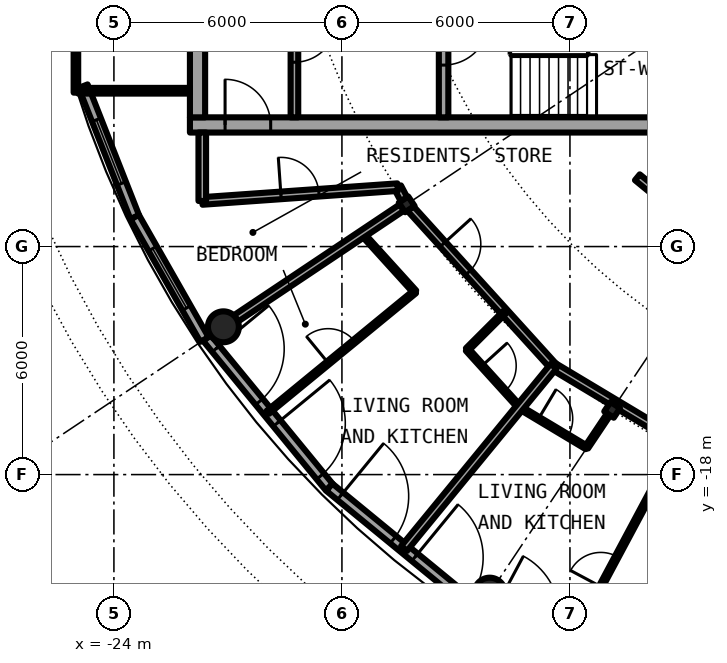
"""IFC4 building model, lengths in metres.
Left out: names, types, materials, properties, quantities, classifications, styles, units other than length and angle.
Written with IfcOpenShell. Run it as: python <this file> out.ifc"""

import sys

from ifc_helpers import new_model, si_unit, direction, frame, frame_2d, origin, origin_2d, place, context, subcontext, project, spatial, rectangle, hollow_circle, i_section, extrude, element, fill, save


model = new_model("IFC4")
c1 = context("Model", 3, precision=1e-05, world=origin(), true_north=direction((0.0, 1.0)))
c2 = subcontext(c1, "Body", "Model", "MODEL_VIEW")
j1 = project(units=[si_unit("LENGTHUNIT", "METRE"), si_unit("PLANEANGLEUNIT", "RADIAN")], contexts=[c1])
p1 = place(None, origin())
s1 = spatial("IfcSite", under=j1, at=p1, CompositionType="ELEMENT")
p2 = place(p1, origin())
s2 = spatial("IfcBuilding", under=s1, at=p2, CompositionType="ELEMENT")
p3 = place(p2, frame((0.0, 0.0, 237.1)))
s3 = spatial("IfcBuildingStorey", under=s2, at=p3, CompositionType="ELEMENT", Elevation=237.1)
for number, where, z_axis, x_axis in (
    (1, (-21.119, -14.112, 0.0), (0.0, 0.0, 1.0), (1.0, 0.0, 0.0)),
    (2, (-14.112, -21.119, 0.0), (0.0, 0.0, 1.0), (1.0, 0.0, 0.0)),
):
    element("IfcColumn", number, at=place(p3, frame(where, z_axis=z_axis, x_axis=x_axis)), inside=s3, PredefinedType="COLUMN", context=c2, shape_type="SweptSolid", body=[
        extrude(hollow_circle(Radius=0.406, WallThickness=0.03, at=origin_2d()), origin(), (0.0, 0.0, 1.0), 3.05),
    ])
for number, where, z_axis, x_axis in (
    (3, (-16.297, -10.889, 0.0), (0.0, 0.0, 1.0), (-0.831, -0.556, 0.0)),
    (4, (-10.889, -16.297, 0.0), (0.0, 0.0, 1.0), (-0.556, -0.831, 0.0)),
):
    element("IfcColumn", number, at=place(p3, frame(where, z_axis=z_axis, x_axis=x_axis)), inside=s3, PredefinedType="COLUMN", context=c2, shape_type="SweptSolid", body=[
        extrude(i_section(OverallWidth=0.3, OverallDepth=0.3, WebThickness=0.011, FlangeThickness=0.019, FilletRadius=0.027, at=origin_2d()), origin(), (0.0, 0.0, 1.0), 3.05),
    ])
p4 = place(p3, frame((-21.556, -14.403, 0.0), z_axis=(0.0, 0.0, 1.0), x_axis=(0.63433059803, -0.77306189429, 0.0)))
e5 = element("IfcWall", 5, at=p4, inside=s3, PredefinedType="SOLIDWALL", context=c2, shape_type="SweptSolid", body=[
    extrude(rectangle(XDim=5.082, YDim=0.25, at=frame_2d((2.541, 0.0))), origin(), (0.0, 0.0, 1.0), 2.7),
])
p5 = place(p4, frame((0.374, 0.0, 0.0)))
e6 = element("IfcOpeningElement", 6, at=p5, cuts=e5, PredefinedType="OPENING", context=c2, shape_type="SweptSolid", body=[
    extrude(rectangle(XDim=1.8, YDim=2.2, at=frame_2d((0.9, 1.1))), frame((0.0, 0.135, 0.0), z_axis=(0.0, -1.0, 0.0), x_axis=(1.0, 0.0, 0.0)), (0.0, 0.0, 1.0), 0.27),
])
p6 = place(p4, frame((2.909, 0.0, 0.0)))
e7 = element("IfcOpeningElement", 7, at=p6, cuts=e5, PredefinedType="OPENING", context=c2, shape_type="SweptSolid", body=[
    extrude(rectangle(XDim=1.8, YDim=2.2, at=frame_2d((0.9, 1.1))), frame((0.0, 0.135, 0.0), z_axis=(0.0, -1.0, 0.0), x_axis=(1.0, 0.0, 0.0)), (0.0, 0.0, 1.0), 0.27),
])
p7 = place(p3, frame((-18.332, -18.332, 0.0), z_axis=(0.0, 0.0, 1.0), x_axis=(0.77306189429, -0.63433059803, 0.0)))
e8 = element("IfcWall", 8, at=p7, inside=s3, PredefinedType="SOLIDWALL", context=c2, shape_type="SweptSolid", body=[
    extrude(rectangle(XDim=5.082, YDim=0.25, at=frame_2d((2.541, 0.0))), origin(), (0.0, 0.0, 1.0), 2.7),
])
p8 = place(p7, frame((0.374, 0.0, 0.0)))
e9 = element("IfcOpeningElement", 9, at=p8, cuts=e8, PredefinedType="OPENING", context=c2, shape_type="SweptSolid", body=[
    extrude(rectangle(XDim=1.8, YDim=2.2, at=frame_2d((0.9, 1.1))), frame((0.0, 0.135, 0.0), z_axis=(0.0, -1.0, 0.0), x_axis=(1.0, 0.0, 0.0)), (0.0, 0.0, 1.0), 0.27),
])
p9 = place(p7, frame((2.909, 0.0, 0.0)))
e10 = element("IfcOpeningElement", 10, at=p9, cuts=e8, PredefinedType="OPENING", context=c2, shape_type="SweptSolid", body=[
    extrude(rectangle(XDim=1.8, YDim=2.2, at=frame_2d((0.9, 1.1))), frame((0.0, 0.135, 0.0), z_axis=(0.0, -1.0, 0.0), x_axis=(1.0, 0.0, 0.0)), (0.0, 0.0, 1.0), 0.27),
])
p10 = place(p3, frame((-24.809, -7.779, 0.0), z_axis=(0.0, 0.0, 1.0), x_axis=(0.366351636034, -0.930476479432, 0.0)))
e11 = element("IfcWall", 11, at=p10, inside=s3, PredefinedType="SOLIDWALL", context=c2, shape_type="SweptSolid", body=[
    extrude(rectangle(XDim=3.705, YDim=0.25, at=frame_2d((1.852, 0.0))), origin(), (0.0, 0.0, 1.0), 2.7),
])
p11 = place(p10, frame((0.952, 0.0, 0.3)))
e12 = element("IfcOpeningElement", 12, at=p11, cuts=e11, PredefinedType="OPENING", context=c2, shape_type="SweptSolid", body=[
    extrude(rectangle(XDim=1.8, YDim=2.1, at=frame_2d((0.9, 1.05))), frame((0.0, 0.135, 0.0), z_axis=(0.0, -1.0, 0.0), x_axis=(1.0, 0.0, 0.0)), (0.0, 0.0, 1.0), 0.27),
])
p12 = place(p3, frame((-23.452, -11.226, 0.0), z_axis=(0.0, 0.0, 1.0), x_axis=(0.495031435966, -0.868875064325, 0.0)))
e13 = element("IfcWall", 13, at=p12, inside=s3, PredefinedType="SOLIDWALL", context=c2, shape_type="SweptSolid", body=[
    extrude(rectangle(XDim=3.705, YDim=0.25, at=frame_2d((1.853, 0.0))), origin(), (0.0, 0.0, 1.0), 2.7),
])
p13 = place(p12, frame((0.952, 0.0, 0.3)))
e14 = element("IfcOpeningElement", 14, at=p13, cuts=e13, PredefinedType="OPENING", context=c2, shape_type="SweptSolid", body=[
    extrude(rectangle(XDim=1.8, YDim=2.1, at=frame_2d((0.9, 1.05))), frame((0.0, 0.135, 0.0), z_axis=(0.0, -1.0, 0.0), x_axis=(1.0, 0.0, 0.0)), (0.0, 0.0, 1.0), 0.27),
])
p14 = place(p3, frame((-22.0, -8.8, 0.0), z_axis=(0.0, 0.0, 1.0), x_axis=(1.0, 0.0, 0.0)))
e15 = element("IfcWall", 15, at=p14, inside=s3, PredefinedType="SHEAR", context=c2, shape_type="SweptSolid", body=[
    extrude(rectangle(XDim=13.4, YDim=0.4, at=frame_2d((6.7, 0.0))), origin(), (0.0, 0.0, 1.0), 3.05),
])
p15 = place(p14, frame((0.925, 0.0, 0.0)))
e16 = element("IfcOpeningElement", 16, at=p15, cuts=e15, PredefinedType="OPENING", context=c2, shape_type="SweptSolid", body=[
    extrude(rectangle(XDim=1.2, YDim=2.3, at=frame_2d((0.6, 1.15))), frame((0.0, 0.21, 0.0), z_axis=(0.0, -1.0, 0.0), x_axis=(1.0, 0.0, 0.0)), (0.0, 0.0, 1.0), 0.42),
])
p16 = place(p3, frame((-21.8, -8.6, 0.0), z_axis=(0.0, 0.0, 1.0), x_axis=(0.0, 1.0, 0.0)))
e17 = element("IfcWall", 17, at=p16, inside=s3, PredefinedType="SHEAR", context=c2, shape_type="SweptSolid", body=[
    extrude(rectangle(XDim=17.2, YDim=0.4, at=frame_2d((8.6, 0.0))), origin(), (0.0, 0.0, 1.0), 3.05),
])
p17 = place(p16, frame((7.7, 0.0, 0.0)))
e18 = element("IfcOpeningElement", 18, at=p17, cuts=e17, PredefinedType="OPENING", context=c2, shape_type="SweptSolid", body=[
    extrude(rectangle(XDim=1.8, YDim=2.3, at=frame_2d((0.9, 1.15))), frame((0.0, 0.21, 0.0), z_axis=(0.0, -1.0, 0.0), x_axis=(1.0, 0.0, 0.0)), (0.0, 0.0, 1.0), 0.42),
])
p18 = place(p3, frame((-15.325, -4.65, 0.0), z_axis=(0.0, 0.0, 1.0), x_axis=(0.0, -1.0, 0.0)))
e19 = element("IfcWall", 19, at=p18, inside=s3, PredefinedType="SHEAR", context=c2, shape_type="SweptSolid", body=[
    extrude(rectangle(XDim=3.95, YDim=0.25, at=frame_2d((1.975, 0.0))), origin(), (0.0, 0.0, 1.0), 3.05),
])
p19 = place(p18, frame((1.375, 0.0, 0.0)))
e20 = element("IfcOpeningElement", 20, at=p19, cuts=e19, PredefinedType="OPENING", context=c2, shape_type="SweptSolid", body=[
    extrude(rectangle(XDim=1.2, YDim=2.3, at=frame_2d((0.6, 1.15))), frame((0.0, 0.135, 0.0), z_axis=(0.0, -1.0, 0.0), x_axis=(1.0, 0.0, 0.0)), (0.0, 0.0, 1.0), 0.27),
])
p20 = place(p3, frame((-19.25, -1.575, 0.0), z_axis=(0.0, 0.0, 1.0), x_axis=(0.0, -1.0, 0.0)))
e21 = element("IfcWall", 21, at=p20, inside=s3, PredefinedType="SOLIDWALL", context=c2, shape_type="SweptSolid", body=[
    extrude(rectangle(XDim=7.025, YDim=0.2, at=frame_2d((3.513, 0.0))), origin(), (0.0, 0.0, 1.0), 2.7),
])
p21 = place(p20, frame((4.475, 0.0, 0.0)))
e22 = element("IfcOpeningElement", 22, at=p21, cuts=e21, PredefinedType="OPENING", context=c2, shape_type="SweptSolid", body=[
    extrude(rectangle(XDim=1.1, YDim=2.3, at=frame_2d((0.55, 1.15))), frame((0.0, 0.11, 0.0), z_axis=(0.0, -1.0, 0.0), x_axis=(1.0, 0.0, 0.0)), (0.0, 0.0, 1.0), 0.22),
])
p22 = place(p3, frame((-22.0, -7.9, 0.0), z_axis=(0.0, 0.0, 1.0), x_axis=(-1.0, 0.0, 0.0)))
e23 = element("IfcWall", 23, at=p22, inside=s3, PredefinedType="PARTITIONING", context=c2, shape_type="SweptSolid", body=[
    extrude(rectangle(XDim=2.94, YDim=0.15, at=frame_2d((1.47, 0.0))), origin(), (0.0, 0.0, 1.0), 2.7),
])
p23 = place(p3, frame((-25.0, 7.95, 0.0), z_axis=(0.0, 0.0, 1.0), x_axis=(0.0, -1.0, 0.0)))
e24 = element("IfcWall", 24, at=p23, inside=s3, PredefinedType="PARTITIONING", context=c2, shape_type="SweptSolid", body=[
    extrude(rectangle(XDim=15.9, YDim=0.12, at=frame_2d((7.95, 0.0))), origin(), (0.0, 0.0, 1.0), 2.7),
])
p24 = place(p23, frame((0.95, 0.0, 0.1)))
e25 = element("IfcOpeningElement", 25, at=p24, cuts=e24, PredefinedType="OPENING", context=c2, shape_type="SweptSolid", body=[
    extrude(rectangle(XDim=14.0, YDim=2.35, at=frame_2d((7.0, 1.175))), frame((0.0, 0.07, 0.0), z_axis=(0.0, -1.0, 0.0), x_axis=(1.0, 0.0, 0.0)), (0.0, 0.0, 1.0), 0.14),
])
p25 = place(p3, frame((-17.462, -11.667, 0.0), z_axis=(0.0, 0.0, 1.0), x_axis=(0.671678456097, -0.74084279818, 0.0)))
e26 = element("IfcWall", 26, at=p25, inside=s3, PredefinedType="PARTITIONING", context=c2, shape_type="SweptSolid", body=[
    extrude(rectangle(XDim=2.054, YDim=0.1, at=frame_2d((1.027, 0.0))), origin(), (0.0, 0.0, 1.0), 2.7),
])
p26 = place(p3, frame((-14.702, -14.711, 0.0), z_axis=(0.0, 0.0, 1.0), x_axis=(0.671678456097, -0.74084279818, 0.0)))
e27 = element("IfcWall", 27, at=p26, inside=s3, PredefinedType="PARTITIONING", context=c2, shape_type="SweptSolid", body=[
    extrude(rectangle(XDim=2.054, YDim=0.1, at=frame_2d((1.027, 0.0))), origin(), (0.0, 0.0, 1.0), 2.7),
])
p27 = place(p26, frame((0.577, 0.0, 0.0)))
e28 = element("IfcOpeningElement", 28, at=p27, cuts=e27, PredefinedType="OPENING", context=c2, shape_type="SweptSolid", body=[
    extrude(rectangle(XDim=0.9, YDim=2.3, at=frame_2d((0.45, 1.15))), frame((0.0, 0.06, 0.0), z_axis=(0.0, -1.0, 0.0), x_axis=(1.0, 0.0, 0.0)), (0.0, 0.0, 1.0), 0.12),
])
p28 = place(p3, frame((-13.322, -16.233, 0.0), z_axis=(0.0, 0.0, 1.0), x_axis=(0.857713062192, -0.514128683254, 0.0)))
e29 = element("IfcWall", 29, at=p28, inside=s3, PredefinedType="PARTITIONING", context=c2, shape_type="SweptSolid", body=[
    extrude(rectangle(XDim=2.054, YDim=0.1, at=frame_2d((1.027, 0.0))), origin(), (0.0, 0.0, 1.0), 2.7),
])
p29 = place(p28, frame((0.577, 0.0, 0.0)))
e30 = element("IfcOpeningElement", 30, at=p29, cuts=e29, PredefinedType="OPENING", context=c2, shape_type="SweptSolid", body=[
    extrude(rectangle(XDim=0.9, YDim=2.3, at=frame_2d((0.45, 1.15))), frame((0.0, 0.06, 0.0), z_axis=(0.0, -1.0, 0.0), x_axis=(1.0, 0.0, 0.0)), (0.0, 0.0, 1.0), 0.12),
])
p30 = place(p3, frame((-16.535, -10.437, 0.0), z_axis=(0.0, 0.0, 1.0), x_axis=(0.465802239822, -0.884888848035, 0.0)))
e31 = element("IfcWall", 31, at=p30, inside=s3, PredefinedType="PARTITIONING", context=c2, shape_type="SweptSolid", body=[
    extrude(rectangle(XDim=0.361, YDim=0.2, at=frame_2d((0.18, 0.0))), origin(), (0.0, 0.0, 1.0), 2.7),
])
p31 = place(p3, frame((-16.195, -11.002, 0.0), z_axis=(0.0, 0.0, 1.0), x_axis=(0.671619657805, -0.740896102871, 0.0)))
e32 = element("IfcWall", 32, at=p31, inside=s3, PredefinedType="PARTITIONING", context=c2, shape_type="SweptSolid", body=[
    extrude(rectangle(XDim=5.6, YDim=0.2, at=frame_2d((2.8, 0.0))), origin(), (0.0, 0.0, 1.0), 2.45),
])
p32 = place(p31, frame((1.265, 0.0, 0.0)))
e33 = element("IfcOpeningElement", 33, at=p32, cuts=e32, PredefinedType="OPENING", context=c2, shape_type="SweptSolid", body=[
    extrude(rectangle(XDim=1.0, YDim=2.3, at=frame_2d((0.5, 1.15))), frame((0.0, 0.11, 0.0), z_axis=(0.0, -1.0, 0.0), x_axis=(1.0, 0.0, 0.0)), (0.0, 0.0, 1.0), 0.22),
])
p33 = place(p3, frame((-12.434, -15.151, 0.0), z_axis=(0.0, 0.0, 1.0), x_axis=(0.857710084627, -0.514133650648, 0.0)))
e34 = element("IfcWall", 34, at=p33, inside=s3, PredefinedType="PARTITIONING", context=c2, shape_type="SweptSolid", body=[
    extrude(rectangle(XDim=5.751, YDim=0.2, at=frame_2d((2.876, 0.0))), origin(), (0.0, 0.0, 1.0), 2.45),
])
p34 = place(p33, frame((3.333, 0.0, 0.0)))
e35 = element("IfcOpeningElement", 35, at=p34, cuts=e34, PredefinedType="OPENING", context=c2, shape_type="SweptSolid", body=[
    extrude(rectangle(XDim=1.0, YDim=2.3, at=frame_2d((0.5, 1.15))), frame((0.0, 0.11, 0.0), z_axis=(0.0, -1.0, 0.0), x_axis=(1.0, 0.0, 0.0)), (0.0, 0.0, 1.0), 0.22),
])
p35 = place(p3, frame((-10.226, -10.177, 0.0), z_axis=(0.0, 0.0, 1.0), x_axis=(0.773071783484, -0.634318545828, 0.0)))
e36 = element("IfcWall", 36, at=p35, inside=s3, PredefinedType="PARTITIONING", context=c2, shape_type="SweptSolid", body=[
    extrude(rectangle(XDim=5.803, YDim=0.2, at=frame_2d((2.901, 0.0))), origin(), (0.0, 0.0, 1.0), 2.7),
])
p36 = place(p35, frame((0.949, 0.0, 0.0)))
e37 = element("IfcOpeningElement", 37, at=p36, cuts=e36, PredefinedType="OPENING", context=c2, shape_type="SweptSolid", body=[
    extrude(rectangle(XDim=1.0, YDim=2.3, at=frame_2d((0.5, 1.15))), frame((0.0, 0.11, 0.0), z_axis=(0.0, -1.0, 0.0), x_axis=(1.0, 0.0, 0.0)), (0.0, 0.0, 1.0), 0.22),
])
p37 = place(p3, frame((-21.675, -10.8, 0.0), z_axis=(0.0, 0.0, 1.0), x_axis=(0.997515141784, 0.070452408845, 0.0)))
e38 = element("IfcWall", 38, at=p37, inside=s3, PredefinedType="PARTITIONING", context=c2, shape_type="SweptSolid", body=[
    extrude(rectangle(XDim=5.153, YDim=0.2, at=frame_2d((2.576, 0.0))), origin(), (0.0, 0.0, 1.0), 2.7),
])
p38 = place(p37, frame((2.076, 0.0, 0.0)))
e39 = element("IfcOpeningElement", 39, at=p38, cuts=e38, PredefinedType="OPENING", context=c2, shape_type="SweptSolid", body=[
    extrude(rectangle(XDim=1.0, YDim=2.3, at=frame_2d((0.5, 1.15))), frame((0.0, 0.11, 0.0), z_axis=(0.0, -1.0, 0.0), x_axis=(1.0, 0.0, 0.0)), (0.0, 0.0, 1.0), 0.22),
])
p39 = place(p3, frame((-20.788, -13.89, 0.0), z_axis=(0.0, 0.0, 1.0), x_axis=(0.831406006746, 0.555665413668, 0.0)))
e40 = element("IfcWall", 40, at=p39, inside=s3, PredefinedType="PARTITIONING", context=c2, shape_type="SweptSolid", body=[
    extrude(rectangle(XDim=5.251, YDim=0.2, at=frame_2d((2.625, 0.0))), origin(), (0.0, 0.0, 1.0), 2.7),
])
p40 = place(p3, frame((-19.949, -16.361, 0.0), z_axis=(0.0, 0.0, 1.0), x_axis=(0.773226150619, 0.634130365145, 0.0)))
e41 = element("IfcWall", 41, at=p40, inside=s3, PredefinedType="PARTITIONING", context=c2, shape_type="SweptSolid", body=[
    extrude(rectangle(XDim=5.002, YDim=0.1, at=frame_2d((2.501, 0.0))), origin(), (0.0, 0.0, 1.0), 2.7),
])
p41 = place(p40, frame((2.051, 0.0, 0.0)))
e42 = element("IfcOpeningElement", 42, at=p41, cuts=e41, PredefinedType="OPENING", context=c2, shape_type="SweptSolid", body=[
    extrude(rectangle(XDim=0.9, YDim=2.3, at=frame_2d((0.45, 1.15))), frame((0.0, 0.06, 0.0), z_axis=(0.0, -1.0, 0.0), x_axis=(1.0, 0.0, 0.0)), (0.0, 0.0, 1.0), 0.12),
])
p42 = place(p3, frame((-16.366, -19.945, 0.0), z_axis=(0.0, 0.0, 1.0), x_axis=(0.634332904094, 0.773060002059, 0.0)))
e43 = element("IfcWall", 43, at=p42, inside=s3, PredefinedType="PARTITIONING", context=c2, shape_type="SweptSolid", body=[
    extrude(rectangle(XDim=6.2, YDim=0.2, at=frame_2d((3.1, 0.0))), origin(), (0.0, 0.0, 1.0), 2.7),
])
p43 = place(p3, frame((-14.703, -14.71, 0.0), z_axis=(0.0, 0.0, 1.0), x_axis=(0.707458838269, 0.706754548733, 0.0)))
e44 = element("IfcWall", 44, at=p43, inside=s3, PredefinedType="PARTITIONING", context=c2, shape_type="SweptSolid", body=[
    extrude(rectangle(XDim=1.386, YDim=0.1, at=frame_2d((0.693, 0.0))), origin(), (0.0, 0.0, 1.0), 2.7),
])
p44 = place(p3, frame((-12.155, -22.757, 0.0), z_axis=(0.0, 0.0, 1.0), x_axis=(0.4711809038, 0.882036595553, 0.0)))
e45 = element("IfcWall", 45, at=p44, inside=s3, PredefinedType="PARTITIONING", context=c2, shape_type="SweptSolid", body=[
    extrude(rectangle(XDim=5.002, YDim=0.1, at=frame_2d((2.501, 0.0))), origin(), (0.0, 0.0, 1.0), 2.7),
])
p45 = place(p44, frame((2.051, 0.0, 0.0)))
e46 = element("IfcOpeningElement", 46, at=p45, cuts=e45, PredefinedType="OPENING", context=c2, shape_type="SweptSolid", body=[
    extrude(rectangle(XDim=0.9, YDim=2.3, at=frame_2d((0.45, 1.15))), frame((0.0, 0.06, 0.0), z_axis=(0.0, -1.0, 0.0), x_axis=(1.0, 0.0, 0.0)), (0.0, 0.0, 1.0), 0.12),
])
p46 = place(p3, frame((-11.565, -17.286, 0.0), z_axis=(0.0, 0.0, 1.0), x_axis=(0.556311964259, 0.830973524502, 0.0)))
e47 = element("IfcWall", 47, at=p46, inside=s3, PredefinedType="PARTITIONING", context=c2, shape_type="SweptSolid", body=[
    extrude(rectangle(XDim=1.048, YDim=0.1, at=frame_2d((0.524, 0.0))), origin(), (0.0, 0.0, 1.0), 2.7),
])
p47 = place(p3, frame((-21.675, -10.8, 0.0), z_axis=(0.0, 0.0, 1.0), x_axis=(0.0, 1.0, 0.0)))
e48 = element("IfcWall", 48, at=p47, inside=s3, PredefinedType="PARTITIONING", context=c2, shape_type="SweptSolid", body=[
    extrude(rectangle(XDim=1.8, YDim=0.2, at=frame_2d((0.9, 0.0))), origin(), (0.0, 0.0, 1.0), 2.7),
])
p48 = place(p5, origin())
e49 = element("IfcDoor", 49, at=p48, inside=s3, OperationType="SINGLE_SWING_LEFT", PredefinedType="DOOR", context=c2, shape_type="SweptSolid", body=[
    extrude(rectangle(XDim=1.8, YDim=2.2, at=frame_2d((0.9, 1.1))), frame((0.0, 0.025, 0.0), z_axis=(0.0, -1.0, 0.0), x_axis=(1.0, 0.0, 0.0)), (0.0, 0.0, 1.0), 0.05),
])
fill(e6, e49)
p49 = place(p6, origin())
e50 = element("IfcDoor", 50, at=p49, inside=s3, OperationType="SINGLE_SWING_LEFT", PredefinedType="DOOR", context=c2, shape_type="SweptSolid", body=[
    extrude(rectangle(XDim=1.8, YDim=2.2, at=frame_2d((0.9, 1.1))), frame((0.0, 0.025, 0.0), z_axis=(0.0, -1.0, 0.0), x_axis=(1.0, 0.0, 0.0)), (0.0, 0.0, 1.0), 0.05),
])
fill(e7, e50)
p50 = place(p8, origin())
e51 = element("IfcDoor", 51, at=p50, inside=s3, OperationType="SINGLE_SWING_LEFT", PredefinedType="DOOR", context=c2, shape_type="SweptSolid", body=[
    extrude(rectangle(XDim=1.8, YDim=2.2, at=frame_2d((0.9, 1.1))), frame((0.0, 0.025, 0.0), z_axis=(0.0, -1.0, 0.0), x_axis=(1.0, 0.0, 0.0)), (0.0, 0.0, 1.0), 0.05),
])
fill(e9, e51)
p51 = place(p9, origin())
e52 = element("IfcDoor", 52, at=p51, inside=s3, OperationType="SINGLE_SWING_LEFT", PredefinedType="DOOR", context=c2, shape_type="SweptSolid", body=[
    extrude(rectangle(XDim=1.8, YDim=2.2, at=frame_2d((0.9, 1.1))), frame((0.0, 0.025, 0.0), z_axis=(0.0, -1.0, 0.0), x_axis=(1.0, 0.0, 0.0)), (0.0, 0.0, 1.0), 0.05),
])
fill(e10, e52)
p52 = place(p11, origin())
e53 = element("IfcWindow", 53, at=p52, inside=s3, PartitioningType="SINGLE_PANEL", PredefinedType="WINDOW", context=c2, shape_type="SweptSolid", body=[
    extrude(rectangle(XDim=1.8, YDim=2.1, at=frame_2d((0.9, 1.05))), frame((0.0, 0.03, 0.0), z_axis=(0.0, -1.0, 0.0), x_axis=(1.0, 0.0, 0.0)), (0.0, 0.0, 1.0), 0.06),
])
fill(e12, e53)
p53 = place(p13, origin())
e54 = element("IfcWindow", 54, at=p53, inside=s3, PartitioningType="SINGLE_PANEL", PredefinedType="WINDOW", context=c2, shape_type="SweptSolid", body=[
    extrude(rectangle(XDim=1.8, YDim=2.1, at=frame_2d((0.9, 1.05))), frame((0.0, 0.03, 0.0), z_axis=(0.0, -1.0, 0.0), x_axis=(1.0, 0.0, 0.0)), (0.0, 0.0, 1.0), 0.06),
])
fill(e14, e54)
p54 = place(p19, origin())
e55 = element("IfcDoor", 55, at=p54, inside=s3, OperationType="SINGLE_SWING_LEFT", PredefinedType="DOOR", context=c2, shape_type="SweptSolid", body=[
    extrude(rectangle(XDim=1.2, YDim=2.3, at=frame_2d((0.6, 1.15))), frame((0.0, 0.025, 0.0), z_axis=(0.0, -1.0, 0.0), x_axis=(1.0, 0.0, 0.0)), (0.0, 0.0, 1.0), 0.05),
])
fill(e20, e55)
p55 = place(p21, origin())
e56 = element("IfcDoor", 56, at=p55, inside=s3, OperationType="SINGLE_SWING_LEFT", PredefinedType="DOOR", context=c2, shape_type="SweptSolid", body=[
    extrude(rectangle(XDim=1.1, YDim=2.3, at=frame_2d((0.55, 1.15))), frame((0.0, 0.025, 0.0), z_axis=(0.0, -1.0, 0.0), x_axis=(1.0, 0.0, 0.0)), (0.0, 0.0, 1.0), 0.05),
])
fill(e22, e56)
p56 = place(p15, origin())
e57 = element("IfcDoor", 57, at=p56, inside=s3, OperationType="SINGLE_SWING_RIGHT", PredefinedType="DOOR", context=c2, shape_type="SweptSolid", body=[
    extrude(rectangle(XDim=1.2, YDim=2.3, at=frame_2d((0.6, 1.15))), frame((0.0, 0.025, 0.0), z_axis=(0.0, -1.0, 0.0), x_axis=(1.0, 0.0, 0.0)), (0.0, 0.0, 1.0), 0.05),
])
fill(e16, e57)
p57 = place(p24, origin())
e58 = element("IfcWindow", 58, at=p57, inside=s3, PartitioningType="SINGLE_PANEL", PredefinedType="WINDOW", context=c2, shape_type="SweptSolid", body=[
    extrude(rectangle(XDim=14.0, YDim=2.35, at=frame_2d((7.0, 1.175))), frame((0.0, 0.03, 0.0), z_axis=(0.0, -1.0, 0.0), x_axis=(1.0, 0.0, 0.0)), (0.0, 0.0, 1.0), 0.06),
])
fill(e25, e58)
p58 = place(p32, origin())
e59 = element("IfcDoor", 59, at=p58, inside=s3, OperationType="SINGLE_SWING_LEFT", PredefinedType="DOOR", context=c2, shape_type="SweptSolid", body=[
    extrude(rectangle(XDim=1.0, YDim=2.3, at=frame_2d((0.5, 1.15))), frame((0.0, 0.025, 0.0), z_axis=(0.0, -1.0, 0.0), x_axis=(1.0, 0.0, 0.0)), (0.0, 0.0, 1.0), 0.05),
])
fill(e33, e59)
p59 = place(p27, origin())
e60 = element("IfcDoor", 60, at=p59, inside=s3, OperationType="SINGLE_SWING_RIGHT", PredefinedType="DOOR", context=c2, shape_type="SweptSolid", body=[
    extrude(rectangle(XDim=0.9, YDim=2.3, at=frame_2d((0.45, 1.15))), frame((0.0, 0.025, 0.0), z_axis=(0.0, -1.0, 0.0), x_axis=(1.0, 0.0, 0.0)), (0.0, 0.0, 1.0), 0.05),
])
fill(e28, e60)
p60 = place(p41, origin())
e61 = element("IfcDoor", 61, at=p60, inside=s3, OperationType="SINGLE_SWING_RIGHT", PredefinedType="DOOR", context=c2, shape_type="SweptSolid", body=[
    extrude(rectangle(XDim=0.9, YDim=2.3, at=frame_2d((0.45, 1.15))), frame((0.0, 0.025, 0.0), z_axis=(0.0, -1.0, 0.0), x_axis=(1.0, 0.0, 0.0)), (0.0, 0.0, 1.0), 0.05),
])
fill(e42, e61)
p61 = place(p29, origin())
e62 = element("IfcDoor", 62, at=p61, inside=s3, OperationType="SINGLE_SWING_RIGHT", PredefinedType="DOOR", context=c2, shape_type="SweptSolid", body=[
    extrude(rectangle(XDim=0.9, YDim=2.3, at=frame_2d((0.45, 1.15))), frame((0.0, 0.025, 0.0), z_axis=(0.0, -1.0, 0.0), x_axis=(1.0, 0.0, 0.0)), (0.0, 0.0, 1.0), 0.05),
])
fill(e30, e62)
p62 = place(p45, origin())
e63 = element("IfcDoor", 63, at=p62, inside=s3, OperationType="SINGLE_SWING_RIGHT", PredefinedType="DOOR", context=c2, shape_type="SweptSolid", body=[
    extrude(rectangle(XDim=0.9, YDim=2.3, at=frame_2d((0.45, 1.15))), frame((0.0, 0.025, 0.0), z_axis=(0.0, -1.0, 0.0), x_axis=(1.0, 0.0, 0.0)), (0.0, 0.0, 1.0), 0.05),
])
fill(e46, e63)
p63 = place(p38, origin())
e64 = element("IfcDoor", 64, at=p63, inside=s3, OperationType="SINGLE_SWING_RIGHT", PredefinedType="DOOR", context=c2, shape_type="SweptSolid", body=[
    extrude(rectangle(XDim=1.0, YDim=2.3, at=frame_2d((0.5, 1.15))), frame((0.0, 0.025, 0.0), z_axis=(0.0, -1.0, 0.0), x_axis=(1.0, 0.0, 0.0)), (0.0, 0.0, 1.0), 0.05),
])
fill(e39, e64)
save(model, sys.argv[1])
